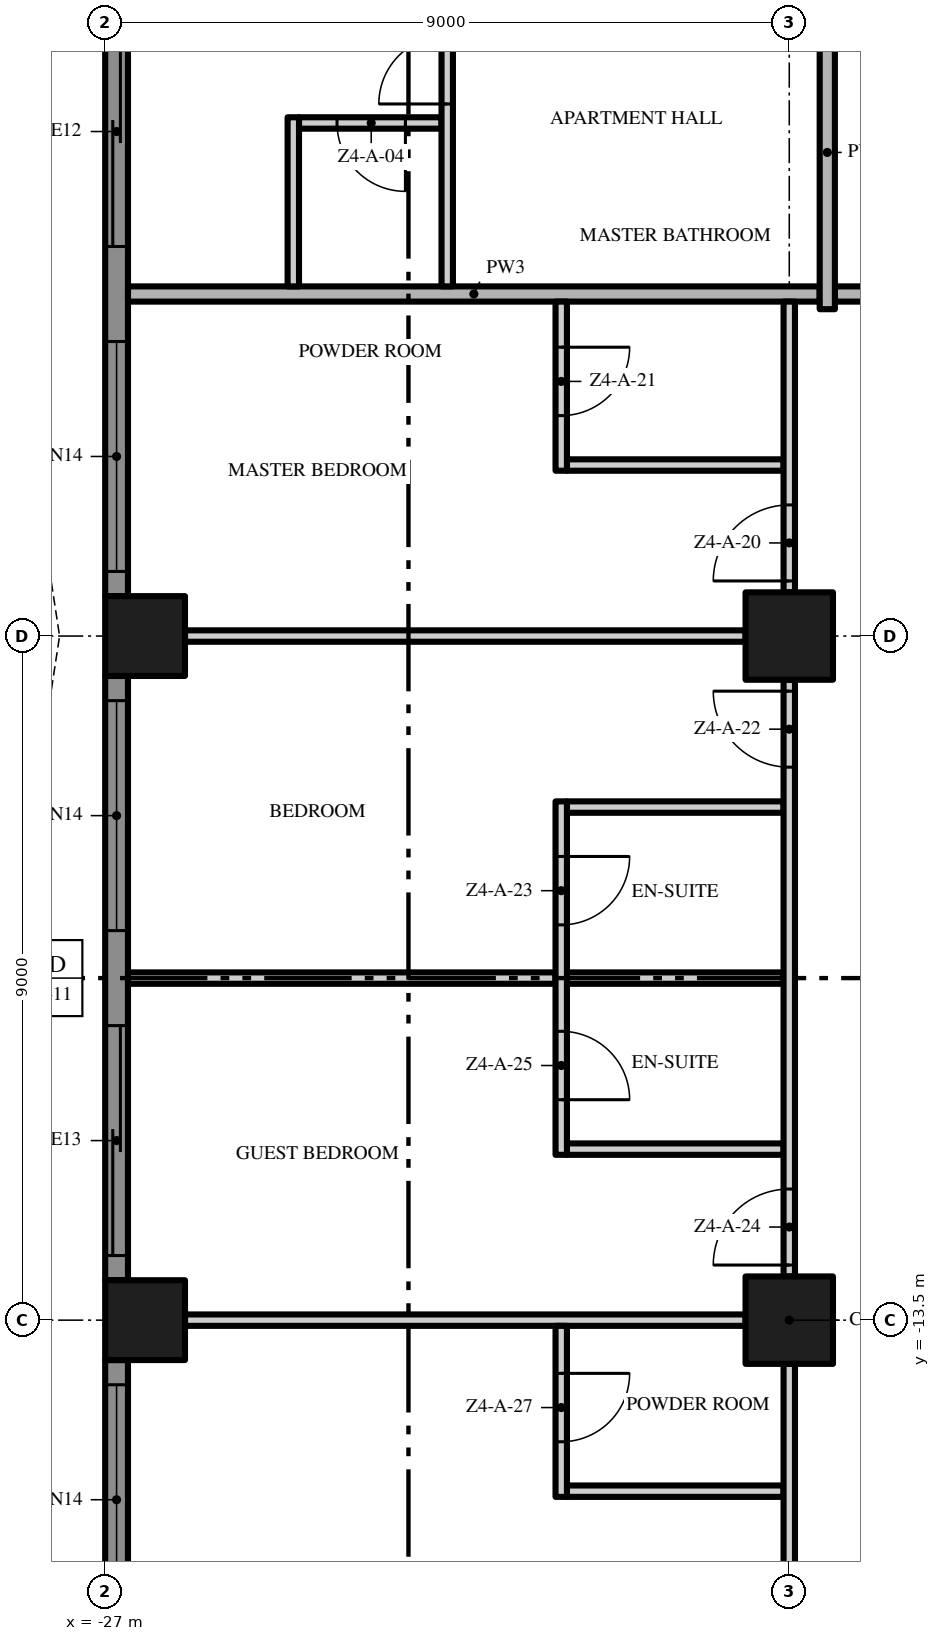
"""IFC4 building model, lengths in metres.
Left out: names, types, materials, properties, quantities, classifications, styles, units other than length and angle.
Written with IfcOpenShell. Run it as: python <this file> out.ifc"""

import sys

from ifc_helpers import new_model, si_unit, direction, frame, frame_2d, origin, origin_2d, place, context, subcontext, project, spatial, polyline, rectangle, outline, extrude, element, fill, save


model = new_model("IFC4")
c1 = context("Model", 3, precision=1e-05, world=origin(), true_north=direction((0.0, 1.0)))
c2 = subcontext(c1, "Body", "Model", "MODEL_VIEW")
j1 = project(units=[si_unit("LENGTHUNIT", "METRE"), si_unit("PLANEANGLEUNIT", "RADIAN")], contexts=[c1])
p1 = place(None, origin())
s1 = spatial("IfcSite", under=j1, at=p1, CompositionType="ELEMENT")
p2 = place(p1, origin())
s2 = spatial("IfcBuilding", under=s1, at=p2, CompositionType="ELEMENT")
p3 = place(p2, frame((0.0, 0.0, 188.2)))
s3 = spatial("IfcBuildingStorey", under=s2, at=p3, CompositionType="ELEMENT", Elevation=188.2)
for number, where, z_axis, x_axis in (
    (1, (-18.0, -13.5, 0.0), (0.0, 0.0, 1.0), (1.0, 0.0, 0.0)),
    (2, (-18.0, -4.5, 0.0), (0.0, 0.0, 1.0), (1.0, 0.0, 0.0)),
):
    element("IfcColumn", number, at=place(p3, frame(where, z_axis=z_axis, x_axis=x_axis)), inside=s3, PredefinedType="COLUMN", context=c2, shape_type="SweptSolid", body=[
        extrude(rectangle(XDim=1.15, YDim=1.15, at=origin_2d()), origin(), (0.0, 0.0, 1.0), 3.5),
    ])
for number, where, z_axis, x_axis in (
    (3, (-26.475, -13.5, 0.0), (0.0, 0.0, 1.0), (1.0, 0.0, 0.0)),
    (4, (-26.475, -4.5, 0.0), (0.0, 0.0, 1.0), (1.0, 0.0, 0.0)),
):
    element("IfcColumn", number, at=place(p3, frame(where, z_axis=z_axis, x_axis=x_axis)), inside=s3, PredefinedType="COLUMN", context=c2, shape_type="SweptSolid", body=[
        extrude(rectangle(XDim=1.05, YDim=1.05, at=origin_2d()), origin(), (0.0, 0.0, 1.0), 3.5),
    ])
p4 = place(p3, frame((-26.85, -3.975, 0.0), z_axis=(0.0, 0.0, 1.0), x_axis=(0.0, 1.0, 0.0)))
e5 = element("IfcWall", 5, at=p4, inside=s3, PredefinedType="SOLIDWALL", context=c2, shape_type="SweptSolid", body=[
    extrude(rectangle(XDim=7.95, YDim=0.3, at=frame_2d((3.975, 0.0))), origin(), (0.0, 0.0, 1.0), 3.5),
])
p5 = place(p4, frame((4.6, 0.0, 0.0)))
e6 = element("IfcOpeningElement", 6, at=p5, cuts=e5, PredefinedType="OPENING", context=c2, shape_type="SweptSolid", body=[
    extrude(rectangle(XDim=3.025, YDim=2.4, at=frame_2d((1.512, 1.2))), frame((0.0, 0.16, 0.0), z_axis=(0.0, -1.0, 0.0), x_axis=(1.0, 0.0, 0.0)), (0.0, 0.0, 1.0), 0.32),
])
p6 = place(p4, frame((0.325, 0.0, 0.45)))
e7 = element("IfcOpeningElement", 7, at=p6, cuts=e5, PredefinedType="OPENING", context=c2, shape_type="SweptSolid", body=[
    extrude(rectangle(XDim=3.025, YDim=2.65, at=frame_2d((1.512, 1.325))), frame((0.0, 0.16, 0.0), z_axis=(0.0, -1.0, 0.0), x_axis=(1.0, 0.0, 0.0)), (0.0, 0.0, 1.0), 0.32),
])
p7 = place(p3, frame((-26.85, -12.975, 0.0), z_axis=(0.0, 0.0, 1.0), x_axis=(0.0, 1.0, 0.0)))
e8 = element("IfcWall", 8, at=p7, inside=s3, PredefinedType="SOLIDWALL", context=c2, shape_type="SweptSolid", body=[
    extrude(rectangle(XDim=7.95, YDim=0.3, at=frame_2d((3.975, 0.0))), origin(), (0.0, 0.0, 1.0), 3.5),
])
p8 = place(p7, frame((4.6, 0.0, 0.45)))
e9 = element("IfcOpeningElement", 9, at=p8, cuts=e8, PredefinedType="OPENING", context=c2, shape_type="SweptSolid", body=[
    extrude(rectangle(XDim=3.025, YDim=2.65, at=frame_2d((1.512, 1.325))), frame((0.0, 0.16, 0.0), z_axis=(0.0, -1.0, 0.0), x_axis=(1.0, 0.0, 0.0)), (0.0, 0.0, 1.0), 0.32),
])
p9 = place(p7, frame((0.325, 0.0, 0.0)))
e10 = element("IfcOpeningElement", 10, at=p9, cuts=e8, PredefinedType="OPENING", context=c2, shape_type="SweptSolid", body=[
    extrude(rectangle(XDim=3.025, YDim=2.4, at=frame_2d((1.512, 1.2))), frame((0.0, 0.16, 0.0), z_axis=(0.0, -1.0, 0.0), x_axis=(1.0, 0.0, 0.0)), (0.0, 0.0, 1.0), 0.32),
])
p10 = place(p3, frame((-26.85, -18.0, 0.0), z_axis=(0.0, 0.0, 1.0), x_axis=(0.0, 1.0, 0.0)))
e11 = element("IfcWall", 11, at=p10, inside=s3, PredefinedType="SOLIDWALL", context=c2, shape_type="SweptSolid", body=[
    extrude(rectangle(XDim=3.975, YDim=0.3, at=frame_2d((1.988, 0.0))), origin(), (0.0, 0.0, 1.0), 3.5),
])
p11 = place(p10, frame((0.625, 0.0, 0.45)))
e12 = element("IfcOpeningElement", 12, at=p11, cuts=e11, PredefinedType="OPENING", context=c2, shape_type="SweptSolid", body=[
    extrude(rectangle(XDim=3.025, YDim=2.65, at=frame_2d((1.512, 1.325))), frame((0.0, 0.16, 0.0), z_axis=(0.0, -1.0, 0.0), x_axis=(1.0, 0.0, 0.0)), (0.0, 0.0, 1.0), 0.32),
])
p12 = place(p3, origin())
e13 = element("IfcWall", 13, at=p12, inside=s3, PredefinedType="USERDEFINED", context=c2, shape_type="SweptSolid", body=[
    extrude(outline(polyline([(-30.0, 18.0), (-29.771, 16.5), (-29.171, 15.0), (-28.429, 13.5), (-27.829, 12.0), (-27.6, 10.5), (-27.829, 9.0), (-28.429, 7.5), (-29.171, 6.0), (-29.771, 4.5), (-30.0, 3.0), (-29.771, 1.5), (-29.171, 0.0), (-28.429, -1.5), (-27.829, -3.0), (-27.6, -4.5), (-27.829, -6.0), (-28.429, -7.5), (-29.171, -9.0), (-29.771, -10.5), (-30.0, -12.0), (-29.771, -13.5), (-29.171, -15.0), (-28.429, -16.5), (-27.829, -18.0), (-27.597, -17.907), (-28.201, -16.398), (-28.942, -14.898), (-29.528, -13.434), (-29.747, -12.0), (-29.528, -10.566), (-28.942, -9.102), (-28.201, -7.602), (-27.586, -6.066), (-27.347, -4.5), (-27.586, -2.934), (-28.201, -1.398), (-28.942, 0.102), (-29.528, 1.566), (-29.747, 3.0), (-29.528, 4.434), (-28.942, 5.898), (-28.201, 7.398), (-27.586, 8.934), (-27.347, 10.5), (-27.586, 12.066), (-28.201, 13.602), (-28.942, 15.102), (-29.528, 16.566), (-29.753, 18.038), (-30.0, 18.0)])), origin(), (0.0, 0.0, 1.0), 0.9),
])
p13 = place(p3, frame((-20.925, -15.75, 0.0), z_axis=(0.0, 0.0, 1.0), x_axis=(1.0, 0.0, 0.0)))
e14 = element("IfcWall", 14, at=p13, inside=s3, PredefinedType="PARTITIONING", context=c2, shape_type="SweptSolid", body=[
    extrude(rectangle(XDim=2.85, YDim=0.15, at=frame_2d((1.425, 0.0))), origin(), (0.0, 0.0, 1.0), 3.5),
])
p14 = place(p3, frame((-25.95, -13.5, 0.0), z_axis=(0.0, 0.0, 1.0), x_axis=(1.0, 0.0, 0.0)))
e15 = element("IfcWall", 15, at=p14, inside=s3, PredefinedType="PARTITIONING", context=c2, shape_type="SweptSolid", body=[
    extrude(rectangle(XDim=7.375, YDim=0.15, at=frame_2d((3.688, 0.0))), origin(), (0.0, 0.0, 1.0), 3.5),
])
p15 = place(p3, frame((-20.925, -11.25, 0.0), z_axis=(0.0, 0.0, 1.0), x_axis=(1.0, 0.0, 0.0)))
e16 = element("IfcWall", 16, at=p15, inside=s3, PredefinedType="PARTITIONING", context=c2, shape_type="SweptSolid", body=[
    extrude(rectangle(XDim=2.85, YDim=0.15, at=frame_2d((1.425, 0.0))), origin(), (0.0, 0.0, 1.0), 3.5),
])
p16 = place(p3, frame((-26.7, -9.0, 0.0), z_axis=(0.0, 0.0, 1.0), x_axis=(1.0, 0.0, 0.0)))
e17 = element("IfcWall", 17, at=p16, inside=s3, PredefinedType="PARTITIONING", context=c2, shape_type="SweptSolid", body=[
    extrude(rectangle(XDim=5.625, YDim=0.15, at=frame_2d((2.812, 0.0))), origin(), (0.0, 0.0, 1.0), 3.5),
])
for number, where, z_axis, x_axis in (
    (18, (-20.925, -9.0, 0.0), (0.0, 0.0, 1.0), (1.0, 0.0, 0.0)),
    (19, (-20.925, -6.75, 0.0), (0.0, 0.0, 1.0), (1.0, 0.0, 0.0)),
):
    element("IfcWall", number, at=place(p3, frame(where, z_axis=z_axis, x_axis=x_axis)), inside=s3, PredefinedType="PARTITIONING", context=c2, shape_type="SweptSolid", body=[
        extrude(rectangle(XDim=2.85, YDim=0.15, at=frame_2d((1.425, 0.0))), origin(), (0.0, 0.0, 1.0), 3.5),
    ])
p17 = place(p3, frame((-25.95, -4.5, 0.0), z_axis=(0.0, 0.0, 1.0), x_axis=(1.0, 0.0, 0.0)))
e20 = element("IfcWall", 20, at=p17, inside=s3, PredefinedType="PARTITIONING", context=c2, shape_type="SweptSolid", body=[
    extrude(rectangle(XDim=7.375, YDim=0.15, at=frame_2d((3.688, 0.0))), origin(), (0.0, 0.0, 1.0), 3.5),
])
p18 = place(p3, frame((-20.925, -2.25, 0.0), z_axis=(0.0, 0.0, 1.0), x_axis=(1.0, 0.0, 0.0)))
e21 = element("IfcWall", 21, at=p18, inside=s3, PredefinedType="PARTITIONING", context=c2, shape_type="SweptSolid", body=[
    extrude(rectangle(XDim=2.85, YDim=0.15, at=frame_2d((1.425, 0.0))), origin(), (0.0, 0.0, 1.0), 3.5),
])
p19 = place(p3, frame((-17.4, 0.0, 0.0), z_axis=(0.0, 0.0, 1.0), x_axis=(1.0, 0.0, 0.0)))
e22 = element("IfcWall", 22, at=p19, inside=s3, PredefinedType="PARTITIONING", context=c2, shape_type="SweptSolid", body=[
    extrude(rectangle(XDim=12.8, YDim=0.2, at=frame_2d((6.4, 0.0))), origin(), (0.0, 0.0, 1.0), 3.5),
])
p20 = place(p3, frame((-26.7, 0.0, 0.0), z_axis=(0.0, 0.0, 1.0), x_axis=(1.0, 0.0, 0.0)))
e23 = element("IfcWall", 23, at=p20, inside=s3, PredefinedType="PARTITIONING", context=c2, shape_type="SweptSolid", body=[
    extrude(rectangle(XDim=9.1, YDim=0.2, at=frame_2d((4.55, 0.0))), origin(), (0.0, 0.0, 1.0), 3.5),
])
p21 = place(p3, frame((-22.575, 2.25, 0.0), z_axis=(0.0, 0.0, 1.0), x_axis=(-1.0, 0.0, 0.0)))
e24 = element("IfcWall", 24, at=p21, inside=s3, PredefinedType="PARTITIONING", context=c2, shape_type="SweptSolid", body=[
    extrude(rectangle(XDim=1.875, YDim=0.15, at=frame_2d((0.938, 0.0))), origin(), (0.0, 0.0, 1.0), 3.5),
])
p22 = place(p21, frame((0.475, 0.0, 0.0)))
e25 = element("IfcOpeningElement", 25, at=p22, cuts=e24, PredefinedType="OPENING", context=c2, shape_type="SweptSolid", body=[
    extrude(rectangle(XDim=0.9, YDim=2.1, at=frame_2d((0.45, 1.05))), frame((0.0, 0.085, 0.0), z_axis=(0.0, -1.0, 0.0), x_axis=(1.0, 0.0, 0.0)), (0.0, 0.0, 1.0), 0.17),
])
p23 = place(p3, frame((-24.525, 0.1, 0.0), z_axis=(0.0, 0.0, 1.0), x_axis=(0.0, 1.0, 0.0)))
e26 = element("IfcWall", 26, at=p23, inside=s3, PredefinedType="PARTITIONING", context=c2, shape_type="SweptSolid", body=[
    extrude(rectangle(XDim=2.225, YDim=0.15, at=frame_2d((1.113, 0.0))), origin(), (0.0, 0.0, 1.0), 3.5),
])
p24 = place(p3, frame((-22.5, 0.1, 0.0), z_axis=(0.0, 0.0, 1.0), x_axis=(0.0, 1.0, 0.0)))
e27 = element("IfcWall", 27, at=p24, inside=s3, PredefinedType="PARTITIONING", context=c2, shape_type="SweptSolid", body=[
    extrude(rectangle(XDim=17.375, YDim=0.15, at=frame_2d((8.688, 0.0))), origin(), (0.0, 0.0, 1.0), 3.5),
])
p25 = place(p24, frame((2.4, 0.0, 0.0)))
e28 = element("IfcOpeningElement", 28, at=p25, cuts=e27, PredefinedType="OPENING", context=c2, shape_type="SweptSolid", body=[
    extrude(rectangle(XDim=1.8, YDim=2.4, at=frame_2d((0.9, 1.2))), frame((0.0, 0.085, 0.0), z_axis=(0.0, -1.0, 0.0), x_axis=(1.0, 0.0, 0.0)), (0.0, 0.0, 1.0), 0.17),
])
p26 = place(p24, frame((10.65, 0.0, 0.0)))
e29 = element("IfcOpeningElement", 29, at=p26, cuts=e27, PredefinedType="OPENING", context=c2, shape_type="SweptSolid", body=[
    extrude(rectangle(XDim=1.0, YDim=2.4, at=frame_2d((0.5, 1.2))), frame((0.0, 0.085, 0.0), z_axis=(0.0, -1.0, 0.0), x_axis=(1.0, 0.0, 0.0)), (0.0, 0.0, 1.0), 0.17),
])
p27 = place(p3, frame((-21.0, -13.575, 0.0), z_axis=(0.0, 0.0, 1.0), x_axis=(0.0, -1.0, 0.0)))
e30 = element("IfcWall", 30, at=p27, inside=s3, PredefinedType="PARTITIONING", context=c2, shape_type="SweptSolid", body=[
    extrude(rectangle(XDim=2.25, YDim=0.15, at=frame_2d((1.125, 0.0))), origin(), (0.0, 0.0, 1.0), 3.5),
])
p28 = place(p27, frame((0.625, 0.0, 0.0)))
e31 = element("IfcOpeningElement", 31, at=p28, cuts=e30, PredefinedType="OPENING", context=c2, shape_type="SweptSolid", body=[
    extrude(rectangle(XDim=0.9, YDim=2.1, at=frame_2d((0.45, 1.05))), frame((0.0, 0.085, 0.0), z_axis=(0.0, -1.0, 0.0), x_axis=(1.0, 0.0, 0.0)), (0.0, 0.0, 1.0), 0.17),
])
p29 = place(p3, frame((-21.0, -6.675, 0.0), z_axis=(0.0, 0.0, 1.0), x_axis=(0.0, -1.0, 0.0)))
e32 = element("IfcWall", 32, at=p29, inside=s3, PredefinedType="PARTITIONING", context=c2, shape_type="SweptSolid", body=[
    extrude(rectangle(XDim=4.65, YDim=0.15, at=frame_2d((2.325, 0.0))), origin(), (0.0, 0.0, 1.0), 3.5),
])
p30 = place(p29, frame((0.725, 0.0, 0.0)))
e33 = element("IfcOpeningElement", 33, at=p30, cuts=e32, PredefinedType="OPENING", context=c2, shape_type="SweptSolid", body=[
    extrude(rectangle(XDim=0.9, YDim=2.1, at=frame_2d((0.45, 1.05))), frame((0.0, 0.085, 0.0), z_axis=(0.0, -1.0, 0.0), x_axis=(1.0, 0.0, 0.0)), (0.0, 0.0, 1.0), 0.17),
])
p31 = place(p29, frame((3.025, 0.0, 0.0)))
e34 = element("IfcOpeningElement", 34, at=p31, cuts=e32, PredefinedType="OPENING", context=c2, shape_type="SweptSolid", body=[
    extrude(rectangle(XDim=0.9, YDim=2.1, at=frame_2d((0.45, 1.05))), frame((0.0, 0.085, 0.0), z_axis=(0.0, -1.0, 0.0), x_axis=(1.0, 0.0, 0.0)), (0.0, 0.0, 1.0), 0.17),
])
p32 = place(p3, frame((-21.0, -0.1, 0.0), z_axis=(0.0, 0.0, 1.0), x_axis=(0.0, -1.0, 0.0)))
e35 = element("IfcWall", 35, at=p32, inside=s3, PredefinedType="PARTITIONING", context=c2, shape_type="SweptSolid", body=[
    extrude(rectangle(XDim=2.225, YDim=0.15, at=frame_2d((1.113, 0.0))), origin(), (0.0, 0.0, 1.0), 3.5),
])
p33 = place(p32, frame((0.6, 0.0, 0.0)))
e36 = element("IfcOpeningElement", 36, at=p33, cuts=e35, PredefinedType="OPENING", context=c2, shape_type="SweptSolid", body=[
    extrude(rectangle(XDim=0.9, YDim=2.1, at=frame_2d((0.45, 1.05))), frame((0.0, 0.085, 0.0), z_axis=(0.0, -1.0, 0.0), x_axis=(1.0, 0.0, 0.0)), (0.0, 0.0, 1.0), 0.17),
])
p34 = place(p3, frame((-18.0, -21.45, 0.0), z_axis=(0.0, 0.0, 1.0), x_axis=(0.0, 1.0, 0.0)))
e37 = element("IfcWall", 37, at=p34, inside=s3, PredefinedType="PARTITIONING", context=c2, shape_type="SweptSolid", body=[
    extrude(rectangle(XDim=7.375, YDim=0.15, at=frame_2d((3.688, 0.0))), origin(), (0.0, 0.0, 1.0), 3.5),
])
p35 = place(p34, frame((1.45, 0.0, 0.0)))
e38 = element("IfcOpeningElement", 38, at=p35, cuts=e37, PredefinedType="OPENING", context=c2, shape_type="SweptSolid", body=[
    extrude(rectangle(XDim=1.8, YDim=2.4, at=frame_2d((0.9, 1.2))), frame((0.0, 0.085, 0.0), z_axis=(0.0, -1.0, 0.0), x_axis=(1.0, 0.0, 0.0)), (0.0, 0.0, 1.0), 0.17),
])
p36 = place(p3, frame((-18.0, -12.925, 0.0), z_axis=(0.0, 0.0, 1.0), x_axis=(0.0, 1.0, 0.0)))
e39 = element("IfcWall", 39, at=p36, inside=s3, PredefinedType="PARTITIONING", context=c2, shape_type="SweptSolid", body=[
    extrude(rectangle(XDim=7.85, YDim=0.15, at=frame_2d((3.925, 0.0))), origin(), (0.0, 0.0, 1.0), 3.5),
])
p37 = place(p36, frame((6.7, 0.0, 0.0)))
e40 = element("IfcOpeningElement", 40, at=p37, cuts=e39, PredefinedType="OPENING", context=c2, shape_type="SweptSolid", body=[
    extrude(rectangle(XDim=1.0, YDim=2.4, at=frame_2d((0.5, 1.2))), frame((0.0, 0.085, 0.0), z_axis=(0.0, -1.0, 0.0), x_axis=(1.0, 0.0, 0.0)), (0.0, 0.0, 1.0), 0.17),
])
p38 = place(p36, frame((0.15, 0.0, 0.0)))
e41 = element("IfcOpeningElement", 41, at=p38, cuts=e39, PredefinedType="OPENING", context=c2, shape_type="SweptSolid", body=[
    extrude(rectangle(XDim=1.0, YDim=2.4, at=frame_2d((0.5, 1.2))), frame((0.0, 0.085, 0.0), z_axis=(0.0, -1.0, 0.0), x_axis=(1.0, 0.0, 0.0)), (0.0, 0.0, 1.0), 0.17),
])
p39 = place(p3, frame((-18.0, -3.925, 0.0), z_axis=(0.0, 0.0, 1.0), x_axis=(0.0, 1.0, 0.0)))
e42 = element("IfcWall", 42, at=p39, inside=s3, PredefinedType="PARTITIONING", context=c2, shape_type="SweptSolid", body=[
    extrude(rectangle(XDim=3.825, YDim=0.15, at=frame_2d((1.913, 0.0))), origin(), (0.0, 0.0, 1.0), 3.5),
])
p40 = place(p39, frame((0.15, 0.0, 0.0)))
e43 = element("IfcOpeningElement", 43, at=p40, cuts=e42, PredefinedType="OPENING", context=c2, shape_type="SweptSolid", body=[
    extrude(rectangle(XDim=1.0, YDim=2.4, at=frame_2d((0.5, 1.2))), frame((0.0, 0.085, 0.0), z_axis=(0.0, -1.0, 0.0), x_axis=(1.0, 0.0, 0.0)), (0.0, 0.0, 1.0), 0.17),
])
p41 = place(p3, frame((-17.5, -0.2, 0.0), z_axis=(0.0, 0.0, 1.0), x_axis=(0.0, 1.0, 0.0)))
e44 = element("IfcWall", 44, at=p41, inside=s3, PredefinedType="PARTITIONING", context=c2, shape_type="SweptSolid", body=[
    extrude(rectangle(XDim=4.125, YDim=0.2, at=frame_2d((2.062, 0.0))), origin(), (0.0, 0.0, 1.0), 3.5),
])
p42 = place(p5, origin())
e45 = element("IfcDoor", 45, at=p42, inside=s3, OperationType="SINGLE_SWING_LEFT", PredefinedType="DOOR", context=c2, shape_type="SweptSolid", body=[
    extrude(rectangle(XDim=3.025, YDim=2.4, at=frame_2d((1.512, 1.2))), frame((0.0, 0.025, 0.0), z_axis=(0.0, -1.0, 0.0), x_axis=(1.0, 0.0, 0.0)), (0.0, 0.0, 1.0), 0.05),
])
fill(e6, e45)
p43 = place(p6, origin())
e46 = element("IfcWindow", 46, at=p43, inside=s3, PartitioningType="SINGLE_PANEL", PredefinedType="WINDOW", context=c2, shape_type="SweptSolid", body=[
    extrude(rectangle(XDim=3.025, YDim=2.65, at=frame_2d((1.512, 1.325))), frame((0.0, 0.03, 0.0), z_axis=(0.0, -1.0, 0.0), x_axis=(1.0, 0.0, 0.0)), (0.0, 0.0, 1.0), 0.06),
])
fill(e7, e46)
p44 = place(p8, origin())
e47 = element("IfcWindow", 47, at=p44, inside=s3, PartitioningType="SINGLE_PANEL", PredefinedType="WINDOW", context=c2, shape_type="SweptSolid", body=[
    extrude(rectangle(XDim=3.025, YDim=2.65, at=frame_2d((1.512, 1.325))), frame((0.0, 0.03, 0.0), z_axis=(0.0, -1.0, 0.0), x_axis=(1.0, 0.0, 0.0)), (0.0, 0.0, 1.0), 0.06),
])
fill(e9, e47)
p45 = place(p9, origin())
e48 = element("IfcDoor", 48, at=p45, inside=s3, OperationType="SINGLE_SWING_LEFT", PredefinedType="DOOR", context=c2, shape_type="SweptSolid", body=[
    extrude(rectangle(XDim=3.025, YDim=2.4, at=frame_2d((1.512, 1.2))), frame((0.0, 0.025, 0.0), z_axis=(0.0, -1.0, 0.0), x_axis=(1.0, 0.0, 0.0)), (0.0, 0.0, 1.0), 0.05),
])
fill(e10, e48)
p46 = place(p11, origin())
e49 = element("IfcWindow", 49, at=p46, inside=s3, PartitioningType="SINGLE_PANEL", PredefinedType="WINDOW", context=c2, shape_type="SweptSolid", body=[
    extrude(rectangle(XDim=3.025, YDim=2.65, at=frame_2d((1.512, 1.325))), frame((0.0, 0.03, 0.0), z_axis=(0.0, -1.0, 0.0), x_axis=(1.0, 0.0, 0.0)), (0.0, 0.0, 1.0), 0.06),
])
fill(e12, e49)
p47 = place(p25, origin())
e50 = element("IfcDoor", 50, at=p47, inside=s3, OperationType="DOUBLE_DOOR_SINGLE_SWING", PredefinedType="DOOR", context=c2, shape_type="SweptSolid", body=[
    extrude(rectangle(XDim=1.8, YDim=2.4, at=frame_2d((0.9, 1.2))), frame((0.0, 0.025, 0.0), z_axis=(0.0, -1.0, 0.0), x_axis=(1.0, 0.0, 0.0)), (0.0, 0.0, 1.0), 0.05),
])
fill(e28, e50)
p48 = place(p22, origin())
e51 = element("IfcDoor", 51, at=p48, inside=s3, OperationType="SINGLE_SWING_LEFT", PredefinedType="DOOR", context=c2, shape_type="SweptSolid", body=[
    extrude(rectangle(XDim=0.9, YDim=2.1, at=frame_2d((0.45, 1.05))), frame((0.0, 0.025, 0.0), z_axis=(0.0, -1.0, 0.0), x_axis=(1.0, 0.0, 0.0)), (0.0, 0.0, 1.0), 0.05),
])
fill(e25, e51)
p49 = place(p40, origin())
e52 = element("IfcDoor", 52, at=p49, inside=s3, OperationType="SINGLE_SWING_LEFT", PredefinedType="DOOR", context=c2, shape_type="SweptSolid", body=[
    extrude(rectangle(XDim=1.0, YDim=2.4, at=frame_2d((0.5, 1.2))), frame((0.0, 0.025, 0.0), z_axis=(0.0, -1.0, 0.0), x_axis=(1.0, 0.0, 0.0)), (0.0, 0.0, 1.0), 0.05),
])
fill(e43, e52)
p50 = place(p33, origin())
e53 = element("IfcDoor", 53, at=p50, inside=s3, OperationType="SINGLE_SWING_LEFT", PredefinedType="DOOR", context=c2, shape_type="SweptSolid", body=[
    extrude(rectangle(XDim=0.9, YDim=2.1, at=frame_2d((0.45, 1.05))), frame((0.0, 0.025, 0.0), z_axis=(0.0, -1.0, 0.0), x_axis=(1.0, 0.0, 0.0)), (0.0, 0.0, 1.0), 0.05),
])
fill(e36, e53)
p51 = place(p37, origin())
e54 = element("IfcDoor", 54, at=p51, inside=s3, OperationType="SINGLE_SWING_RIGHT", PredefinedType="DOOR", context=c2, shape_type="SweptSolid", body=[
    extrude(rectangle(XDim=1.0, YDim=2.4, at=frame_2d((0.5, 1.2))), frame((0.0, 0.025, 0.0), z_axis=(0.0, -1.0, 0.0), x_axis=(1.0, 0.0, 0.0)), (0.0, 0.0, 1.0), 0.05),
])
fill(e40, e54)
p52 = place(p30, origin())
e55 = element("IfcDoor", 55, at=p52, inside=s3, OperationType="SINGLE_SWING_LEFT", PredefinedType="DOOR", context=c2, shape_type="SweptSolid", body=[
    extrude(rectangle(XDim=0.9, YDim=2.1, at=frame_2d((0.45, 1.05))), frame((0.0, 0.025, 0.0), z_axis=(0.0, -1.0, 0.0), x_axis=(1.0, 0.0, 0.0)), (0.0, 0.0, 1.0), 0.05),
])
fill(e33, e55)
p53 = place(p38, origin())
e56 = element("IfcDoor", 56, at=p53, inside=s3, OperationType="SINGLE_SWING_LEFT", PredefinedType="DOOR", context=c2, shape_type="SweptSolid", body=[
    extrude(rectangle(XDim=1.0, YDim=2.4, at=frame_2d((0.5, 1.2))), frame((0.0, 0.025, 0.0), z_axis=(0.0, -1.0, 0.0), x_axis=(1.0, 0.0, 0.0)), (0.0, 0.0, 1.0), 0.05),
])
fill(e41, e56)
p54 = place(p31, origin())
e57 = element("IfcDoor", 57, at=p54, inside=s3, OperationType="SINGLE_SWING_RIGHT", PredefinedType="DOOR", context=c2, shape_type="SweptSolid", body=[
    extrude(rectangle(XDim=0.9, YDim=2.1, at=frame_2d((0.45, 1.05))), frame((0.0, 0.025, 0.0), z_axis=(0.0, -1.0, 0.0), x_axis=(1.0, 0.0, 0.0)), (0.0, 0.0, 1.0), 0.05),
])
fill(e34, e57)
p55 = place(p28, origin())
e58 = element("IfcDoor", 58, at=p55, inside=s3, OperationType="SINGLE_SWING_LEFT", PredefinedType="DOOR", context=c2, shape_type="SweptSolid", body=[
    extrude(rectangle(XDim=0.9, YDim=2.1, at=frame_2d((0.45, 1.05))), frame((0.0, 0.025, 0.0), z_axis=(0.0, -1.0, 0.0), x_axis=(1.0, 0.0, 0.0)), (0.0, 0.0, 1.0), 0.05),
])
fill(e31, e58)
save(model, sys.argv[1])
